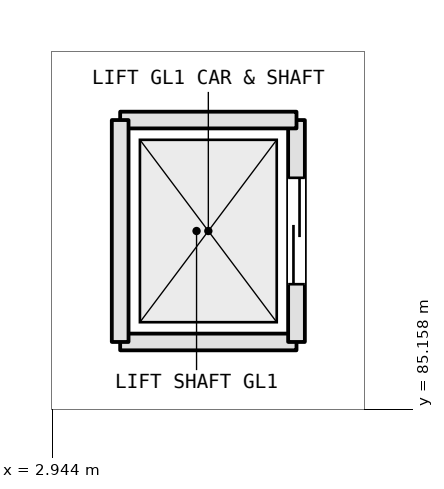
"""IFC4 building model, lengths in metres.
Left out: names, types, materials, properties, quantities, classifications, styles, units other than length and angle.
Written with IfcOpenShell. Run it as: python <this file> out.ifc"""

import sys

from ifc_helpers import new_model, si_unit, direction, frame, frame_2d, origin, place, context, subcontext, project, spatial, rectangle, extrude, element, fill, save


model = new_model("IFC4")
c1 = context("Model", 3, precision=1e-05, world=origin(), true_north=direction((0.0, 1.0)))
c2 = subcontext(c1, "Body", "Model", "MODEL_VIEW")
j1 = project(units=[si_unit("LENGTHUNIT", "METRE"), si_unit("PLANEANGLEUNIT", "RADIAN")], contexts=[c1])
p1 = place(None, origin())
s1 = spatial("IfcSite", under=j1, at=p1, CompositionType="ELEMENT")
p2 = place(p1, origin())
s2 = spatial("IfcBuilding", under=s1, at=p2, CompositionType="ELEMENT")
p3 = place(p2, frame((0.0, 0.0, 10.8)))
s3 = spatial("IfcBuildingStorey", under=s2, at=p3, CompositionType="ELEMENT", Elevation=10.8)
p4 = place(p3, frame((3.84, 86.04, 0.0), z_axis=(0.0, 0.0, 1.0), x_axis=(1.0, 0.0, 0.0)))
e1 = element("IfcWall", 1, at=p4, inside=s3, PredefinedType="SHEAR", context=c2, shape_type="SweptSolid", body=[
    extrude(rectangle(XDim=2.32, YDim=0.22, at=frame_2d((1.16, 0.0))), origin(), (0.0, 0.0, 1.0), 5.15),
])
p5 = place(p3, frame((6.16, 86.04, 0.0), z_axis=(0.0, 0.0, 1.0), x_axis=(0.0, 1.0, 0.0)))
e2 = element("IfcWall", 2, at=p5, inside=s3, PredefinedType="SHEAR", context=c2, shape_type="SweptSolid", body=[
    extrude(rectangle(XDim=2.92, YDim=0.22, at=frame_2d((1.46, 0.0))), origin(), (0.0, 0.0, 1.0), 5.15),
])
p6 = place(p5, frame((0.76, 0.0, 0.0)))
e3 = element("IfcOpeningElement", 3, at=p6, cuts=e2, PredefinedType="OPENING", context=c2, shape_type="SweptSolid", body=[
    extrude(rectangle(XDim=1.4, YDim=2.3, at=frame_2d((0.7, 1.15))), frame((0.0, 0.12, 0.0), z_axis=(0.0, -1.0, 0.0), x_axis=(1.0, 0.0, 0.0)), (0.0, 0.0, 1.0), 0.24),
])
p7 = place(p3, frame((6.16, 88.96, 0.0), z_axis=(0.0, 0.0, 1.0), x_axis=(-1.0, 0.0, 0.0)))
e4 = element("IfcWall", 4, at=p7, inside=s3, PredefinedType="SHEAR", context=c2, shape_type="SweptSolid", body=[
    extrude(rectangle(XDim=2.32, YDim=0.22, at=frame_2d((1.16, 0.0))), origin(), (0.0, 0.0, 1.0), 5.15),
])
p8 = place(p3, frame((3.84, 88.96, 0.0), z_axis=(0.0, 0.0, 1.0), x_axis=(0.0, -1.0, 0.0)))
e5 = element("IfcWall", 5, at=p8, inside=s3, PredefinedType="SHEAR", context=c2, shape_type="SweptSolid", body=[
    extrude(rectangle(XDim=2.92, YDim=0.22, at=frame_2d((1.46, 0.0))), origin(), (0.0, 0.0, 1.0), 5.15),
])
p9 = place(p6, origin())
e6 = element("IfcDoor", 6, at=p9, inside=s3, OperationType="DOUBLE_DOOR_SLIDING", PredefinedType="DOOR", context=c2, shape_type="SweptSolid", body=[
    extrude(rectangle(XDim=1.4, YDim=2.3, at=frame_2d((0.7, 1.15))), frame((0.0, 0.025, 0.0), z_axis=(0.0, -1.0, 0.0), x_axis=(1.0, 0.0, 0.0)), (0.0, 0.0, 1.0), 0.05),
])
fill(e3, e6)
save(model, sys.argv[1])
